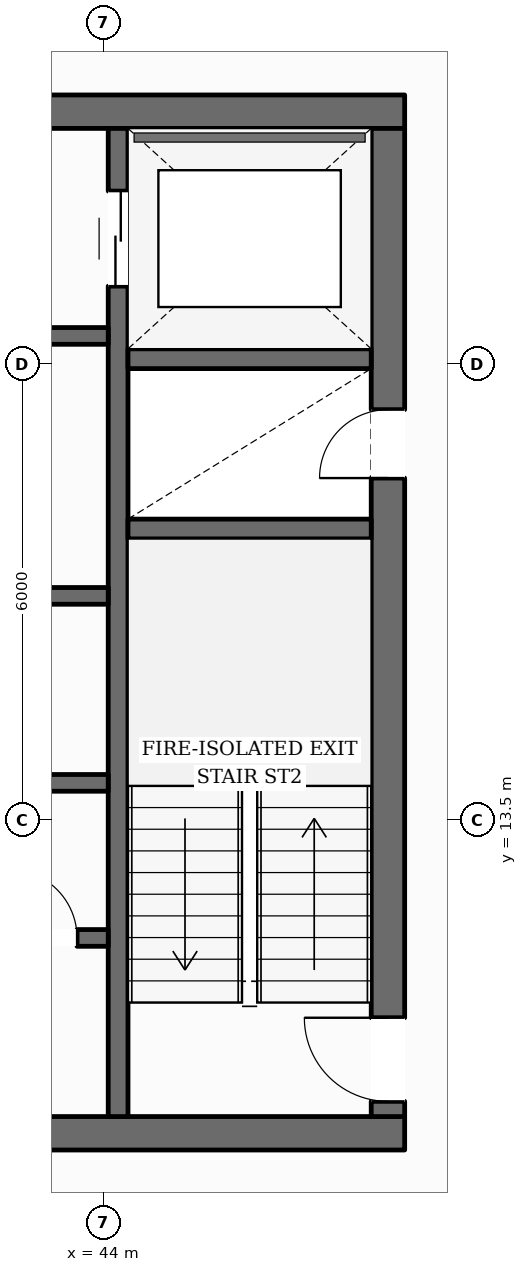
"""IFC4 building model, lengths in metres.
Left out: names, types, materials, properties, quantities, classifications, styles, units other than length and angle.
Written with IfcOpenShell. Run it as: python <this file> out.ifc"""

import sys

from ifc_helpers import new_model, si_unit, direction, frame, frame_2d, origin, place, context, subcontext, project, spatial, rectangle, extrude, element, fill, save


model = new_model("IFC4")
c1 = context("Model", 3, precision=1e-05, world=origin(), true_north=direction((0.0, 1.0)))
c2 = subcontext(c1, "Body", "Model", "MODEL_VIEW")
j1 = project(units=[si_unit("LENGTHUNIT", "METRE"), si_unit("PLANEANGLEUNIT", "RADIAN")], contexts=[c1])
p1 = place(None, origin())
s1 = spatial("IfcSite", under=j1, at=p1, CompositionType="ELEMENT")
p2 = place(p1, origin())
s2 = spatial("IfcBuilding", under=s1, at=p2, CompositionType="ELEMENT")
p3 = place(p2, frame((0.0, 0.0, 230.45)))
s3 = spatial("IfcBuildingStorey", under=s2, at=p3, CompositionType="ELEMENT", Elevation=230.45)
p4 = place(p3, frame((28.04, 9.38, 0.0), z_axis=(0.0, 0.0, 1.0), x_axis=(1.0, 0.0, 0.0)))
e1 = element("IfcWall", 1, at=p4, inside=s3, PredefinedType="SOLIDWALL", context=c2, shape_type="SweptSolid", body=[
    extrude(rectangle(XDim=19.92, YDim=0.44, at=frame_2d((9.96, 0.0))), origin(), (0.0, 0.0, 1.0), 3.43),
])
p5 = place(p4, frame((10.46, 0.0, 0.0)))
e2 = element("IfcOpeningElement", 2, at=p5, cuts=e1, PredefinedType="OPENING", context=c2, shape_type="SweptSolid", body=[
    extrude(rectangle(XDim=1.4, YDim=2.2, at=frame_2d((0.7, 1.1))), frame((0.0, 0.23, 0.0), z_axis=(0.0, -1.0, 0.0), x_axis=(1.0, 0.0, 0.0)), (0.0, 0.0, 1.0), 0.46),
])
p6 = place(p3, frame((28.04, 22.82, 0.0), z_axis=(0.0, 0.0, 1.0), x_axis=(1.0, 0.0, 0.0)))
e3 = element("IfcWall", 3, at=p6, inside=s3, PredefinedType="SOLIDWALL", context=c2, shape_type="SweptSolid", body=[
    extrude(rectangle(XDim=19.92, YDim=0.44, at=frame_2d((9.96, 0.0))), origin(), (0.0, 0.0, 1.0), 3.43),
])
p7 = place(p6, frame((6.235, 0.0, 0.0)))
e4 = element("IfcOpeningElement", 4, at=p7, cuts=e3, PredefinedType="OPENING", context=c2, shape_type="SweptSolid", body=[
    extrude(rectangle(XDim=1.05, YDim=2.15, at=frame_2d((0.525, 1.075))), frame((0.0, 0.23, 0.0), z_axis=(0.0, -1.0, 0.0), x_axis=(1.0, 0.0, 0.0)), (0.0, 0.0, 1.0), 0.46),
])
p8 = place(p6, frame((12.635, 0.0, 0.0)))
e5 = element("IfcOpeningElement", 5, at=p8, cuts=e3, PredefinedType="OPENING", context=c2, shape_type="SweptSolid", body=[
    extrude(rectangle(XDim=1.05, YDim=2.15, at=frame_2d((0.525, 1.075))), frame((0.0, 0.23, 0.0), z_axis=(0.0, -1.0, 0.0), x_axis=(1.0, 0.0, 0.0)), (0.0, 0.0, 1.0), 0.46),
])
p9 = place(p3, frame((47.74, 9.6, 0.0), z_axis=(0.0, 0.0, 1.0), x_axis=(0.0, 1.0, 0.0)))
e6 = element("IfcWall", 6, at=p9, inside=s3, PredefinedType="SOLIDWALL", context=c2, shape_type="SweptSolid", body=[
    extrude(rectangle(XDim=13.0, YDim=0.44, at=frame_2d((6.5, 0.0))), origin(), (0.0, 0.0, 1.0), 3.43),
])
p10 = place(p9, frame((0.2, 0.0, 0.0)))
e7 = element("IfcOpeningElement", 7, at=p10, cuts=e6, PredefinedType="OPENING", context=c2, shape_type="SweptSolid", body=[
    extrude(rectangle(XDim=1.1, YDim=2.15, at=frame_2d((0.55, 1.075))), frame((0.0, 0.23, 0.0), z_axis=(0.0, -1.0, 0.0), x_axis=(1.0, 0.0, 0.0)), (0.0, 0.0, 1.0), 0.46),
])
p11 = place(p9, frame((8.4, 0.0, 0.0)))
e8 = element("IfcOpeningElement", 8, at=p11, cuts=e6, PredefinedType="OPENING", context=c2, shape_type="SweptSolid", body=[
    extrude(rectangle(XDim=0.9, YDim=2.1, at=frame_2d((0.45, 1.05))), frame((0.0, 0.23, 0.0), z_axis=(0.0, -1.0, 0.0), x_axis=(1.0, 0.0, 0.0)), (0.0, 0.0, 1.0), 0.46),
])
p12 = place(p3, frame((44.19, 9.6, 0.0), z_axis=(0.0, 0.0, 1.0), x_axis=(0.0, 1.0, 0.0)))
e9 = element("IfcWall", 9, at=p12, inside=s3, PredefinedType="SHEAR", context=c2, shape_type="SweptSolid", body=[
    extrude(rectangle(XDim=13.0, YDim=0.26, at=frame_2d((6.5, 0.0))), origin(), (0.0, 0.0, 1.0), 3.43),
])
p13 = place(p12, frame((10.925, 0.0, 0.0)))
e10 = element("IfcOpeningElement", 10, at=p13, cuts=e9, PredefinedType="OPENING", context=c2, shape_type="SweptSolid", body=[
    extrude(rectangle(XDim=1.25, YDim=2.25, at=frame_2d((0.625, 1.125))), frame((0.0, 0.14, 0.0), z_axis=(0.0, -1.0, 0.0), x_axis=(1.0, 0.0, 0.0)), (0.0, 0.0, 1.0), 0.28),
])
for number, where, z_axis, x_axis in (
    (11, (44.32, 17.33, 0.0), (0.0, 0.0, 1.0), (1.0, 0.0, 0.0)),
    (12, (44.32, 19.57, 0.0), (0.0, 0.0, 1.0), (1.0, 0.0, 0.0)),
):
    element("IfcWall", number, at=place(p3, frame(where, z_axis=z_axis, x_axis=x_axis)), inside=s3, PredefinedType="SHEAR", context=c2, shape_type="SweptSolid", body=[
        extrude(rectangle(XDim=3.2, YDim=0.26, at=frame_2d((1.6, 0.0))), origin(), (0.0, 0.0, 1.0), 3.43),
    ])
p14 = place(p3, frame((31.94, 19.87, 0.0), z_axis=(0.0, 0.0, 1.0), x_axis=(1.0, 0.0, 0.0)))
e13 = element("IfcWall", 13, at=p14, inside=s3, PredefinedType="SOLIDWALL", context=c2, shape_type="SweptSolid", body=[
    extrude(rectangle(XDim=12.12, YDim=0.22, at=frame_2d((6.06, 0.0))), origin(), (0.0, 0.0, 1.0), 3.43),
])
p15 = place(p14, frame((6.3, 0.0, 0.0)))
e14 = element("IfcOpeningElement", 14, at=p15, cuts=e13, PredefinedType="OPENING", context=c2, shape_type="SweptSolid", body=[
    extrude(rectangle(XDim=1.1, YDim=2.15, at=frame_2d((0.55, 1.075))), frame((0.0, 0.12, 0.0), z_axis=(0.0, -1.0, 0.0), x_axis=(1.0, 0.0, 0.0)), (0.0, 0.0, 1.0), 0.24),
])
p16 = place(p14, frame((9.51, 0.0, 0.0)))
e15 = element("IfcOpeningElement", 15, at=p16, cuts=e13, PredefinedType="OPENING", context=c2, shape_type="SweptSolid", body=[
    extrude(rectangle(XDim=0.9, YDim=2.1, at=frame_2d((0.45, 1.05))), frame((0.0, 0.12, 0.0), z_axis=(0.0, -1.0, 0.0), x_axis=(1.0, 0.0, 0.0)), (0.0, 0.0, 1.0), 0.24),
])
p17 = place(p3, frame((31.94, 16.45, 0.0), z_axis=(0.0, 0.0, 1.0), x_axis=(1.0, 0.0, 0.0)))
e16 = element("IfcWall", 16, at=p17, inside=s3, PredefinedType="SOLIDWALL", context=c2, shape_type="SweptSolid", body=[
    extrude(rectangle(XDim=12.12, YDim=0.22, at=frame_2d((6.06, 0.0))), origin(), (0.0, 0.0, 1.0), 3.43),
])
p18 = place(p3, frame((31.94, 13.99, 0.0), z_axis=(0.0, 0.0, 1.0), x_axis=(1.0, 0.0, 0.0)))
e17 = element("IfcWall", 17, at=p18, inside=s3, PredefinedType="SOLIDWALL", context=c2, shape_type="SweptSolid", body=[
    extrude(rectangle(XDim=12.12, YDim=0.22, at=frame_2d((6.06, 0.0))), origin(), (0.0, 0.0, 1.0), 3.43),
])
p19 = place(p18, frame((1.11, 0.0, 0.0)))
e18 = element("IfcOpeningElement", 18, at=p19, cuts=e17, PredefinedType="OPENING", context=c2, shape_type="SweptSolid", body=[
    extrude(rectangle(XDim=0.9, YDim=2.1, at=frame_2d((0.45, 1.05))), frame((0.0, 0.12, 0.0), z_axis=(0.0, -1.0, 0.0), x_axis=(1.0, 0.0, 0.0)), (0.0, 0.0, 1.0), 0.24),
])
p20 = place(p18, frame((5.16, 0.0, 0.0)))
e19 = element("IfcOpeningElement", 19, at=p20, cuts=e17, PredefinedType="OPENING", context=c2, shape_type="SweptSolid", body=[
    extrude(rectangle(XDim=0.9, YDim=2.1, at=frame_2d((0.45, 1.05))), frame((0.0, 0.12, 0.0), z_axis=(0.0, -1.0, 0.0), x_axis=(1.0, 0.0, 0.0)), (0.0, 0.0, 1.0), 0.24),
])
p21 = place(p18, frame((9.61, 0.0, 0.0)))
e20 = element("IfcOpeningElement", 20, at=p21, cuts=e17, PredefinedType="OPENING", context=c2, shape_type="SweptSolid", body=[
    extrude(rectangle(XDim=0.9, YDim=2.1, at=frame_2d((0.45, 1.05))), frame((0.0, 0.12, 0.0), z_axis=(0.0, -1.0, 0.0), x_axis=(1.0, 0.0, 0.0)), (0.0, 0.0, 1.0), 0.24),
])
p22 = place(p3, frame((40.28, 11.95, 0.0), z_axis=(0.0, 0.0, 1.0), x_axis=(1.0, 0.0, 0.0)))
e21 = element("IfcWall", 21, at=p22, inside=s3, PredefinedType="SOLIDWALL", context=c2, shape_type="SweptSolid", body=[
    extrude(rectangle(XDim=3.78, YDim=0.22, at=frame_2d((1.89, 0.0))), origin(), (0.0, 0.0, 1.0), 3.43),
])
p23 = place(p22, frame((0.62, 0.0, 0.0)))
e22 = element("IfcOpeningElement", 22, at=p23, cuts=e21, PredefinedType="OPENING", context=c2, shape_type="SweptSolid", body=[
    extrude(rectangle(XDim=0.9, YDim=2.1, at=frame_2d((0.45, 1.05))), frame((0.0, 0.12, 0.0), z_axis=(0.0, -1.0, 0.0), x_axis=(1.0, 0.0, 0.0)), (0.0, 0.0, 1.0), 0.24),
])
p24 = place(p22, frame((2.47, 0.0, 0.0)))
e23 = element("IfcOpeningElement", 23, at=p24, cuts=e21, PredefinedType="OPENING", context=c2, shape_type="SweptSolid", body=[
    extrude(rectangle(XDim=0.9, YDim=2.1, at=frame_2d((0.45, 1.05))), frame((0.0, 0.12, 0.0), z_axis=(0.0, -1.0, 0.0), x_axis=(1.0, 0.0, 0.0)), (0.0, 0.0, 1.0), 0.24),
])
p25 = place(p3, frame((41.688, 45.48, 0.0), z_axis=(0.0, 0.0, 1.0), x_axis=(0.491295447758, -0.870992986775, 0.0)))
e24 = element("IfcWall", 24, at=p25, inside=s3, PredefinedType="STANDARD", context=c2, shape_type="SweptSolid", body=[
    extrude(rectangle(XDim=39.483, YDim=0.35, at=frame_2d((19.742, 0.0))), origin(), (0.0, 0.0, 1.0), 2.962),
])
p26 = place(p25, frame((9.471, 0.0, 0.0)))
e25 = element("IfcOpeningElement", 25, at=p26, cuts=e24, PredefinedType="OPENING", context=c2, shape_type="SweptSolid", body=[
    extrude(rectangle(XDim=1.0, YDim=2.2, at=frame_2d((0.5, 1.1))), frame((0.0, 0.185, 0.0), z_axis=(0.0, -1.0, 0.0), x_axis=(1.0, 0.0, 0.0)), (0.0, 0.0, 1.0), 0.37),
])
p27 = place(p25, frame((35.076, 0.0, 0.55)))
e26 = element("IfcOpeningElement", 26, at=p27, cuts=e24, PredefinedType="OPENING", context=c2, shape_type="SweptSolid", body=[
    extrude(rectangle(XDim=1.45, YDim=1.6, at=frame_2d((0.725, 0.8))), frame((0.0, 0.185, 0.0), z_axis=(0.0, -1.0, 0.0), x_axis=(1.0, 0.0, 0.0)), (0.0, 0.0, 1.0), 0.37),
])
p28 = place(p25, frame((28.654, 0.0, 0.55)))
e27 = element("IfcOpeningElement", 27, at=p28, cuts=e24, PredefinedType="OPENING", context=c2, shape_type="SweptSolid", body=[
    extrude(rectangle(XDim=1.45, YDim=1.6, at=frame_2d((0.725, 0.8))), frame((0.0, 0.185, 0.0), z_axis=(0.0, -1.0, 0.0), x_axis=(1.0, 0.0, 0.0)), (0.0, 0.0, 1.0), 0.37),
])
p29 = place(p25, frame((22.232, 0.0, 0.55)))
e28 = element("IfcOpeningElement", 28, at=p29, cuts=e24, PredefinedType="OPENING", context=c2, shape_type="SweptSolid", body=[
    extrude(rectangle(XDim=1.45, YDim=1.6, at=frame_2d((0.725, 0.8))), frame((0.0, 0.185, 0.0), z_axis=(0.0, -1.0, 0.0), x_axis=(1.0, 0.0, 0.0)), (0.0, 0.0, 1.0), 0.37),
])
p30 = place(p25, frame((2.967, 0.0, 0.55)))
e29 = element("IfcOpeningElement", 29, at=p30, cuts=e24, PredefinedType="OPENING", context=c2, shape_type="SweptSolid", body=[
    extrude(rectangle(XDim=1.45, YDim=1.6, at=frame_2d((0.725, 0.8))), frame((0.0, 0.185, 0.0), z_axis=(0.0, -1.0, 0.0), x_axis=(1.0, 0.0, 0.0)), (0.0, 0.0, 1.0), 0.37),
])
p31 = place(p10, origin())
e30 = element("IfcDoor", 30, at=p31, inside=s3, OperationType="SINGLE_SWING_RIGHT", PredefinedType="DOOR", context=c2, shape_type="SweptSolid", body=[
    extrude(rectangle(XDim=1.1, YDim=2.15, at=frame_2d((0.55, 1.075))), frame((0.0, 0.025, 0.0), z_axis=(0.0, -1.0, 0.0), x_axis=(1.0, 0.0, 0.0)), (0.0, 0.0, 1.0), 0.05),
])
fill(e7, e30)
p32 = place(p11, origin())
e31 = element("IfcDoor", 31, at=p32, inside=s3, OperationType="SINGLE_SWING_LEFT", PredefinedType="DOOR", context=c2, shape_type="SweptSolid", body=[
    extrude(rectangle(XDim=0.9, YDim=2.1, at=frame_2d((0.45, 1.05))), frame((0.0, 0.025, 0.0), z_axis=(0.0, -1.0, 0.0), x_axis=(1.0, 0.0, 0.0)), (0.0, 0.0, 1.0), 0.05),
])
fill(e8, e31)
p33 = place(p13, origin())
e32 = element("IfcDoor", 32, at=p33, inside=s3, OperationType="DOUBLE_DOOR_SLIDING", PredefinedType="DOOR", context=c2, shape_type="SweptSolid", body=[
    extrude(rectangle(XDim=1.25, YDim=2.25, at=frame_2d((0.625, 1.125))), frame((0.0, 0.025, 0.0), z_axis=(0.0, -1.0, 0.0), x_axis=(1.0, 0.0, 0.0)), (0.0, 0.0, 1.0), 0.05),
])
fill(e10, e32)
p34 = place(p24, origin())
e33 = element("IfcDoor", 33, at=p34, inside=s3, OperationType="SINGLE_SWING_LEFT", PredefinedType="DOOR", context=c2, shape_type="SweptSolid", body=[
    extrude(rectangle(XDim=0.9, YDim=2.1, at=frame_2d((0.45, 1.05))), frame((0.0, 0.025, 0.0), z_axis=(0.0, -1.0, 0.0), x_axis=(1.0, 0.0, 0.0)), (0.0, 0.0, 1.0), 0.05),
])
fill(e23, e33)
save(model, sys.argv[1])
